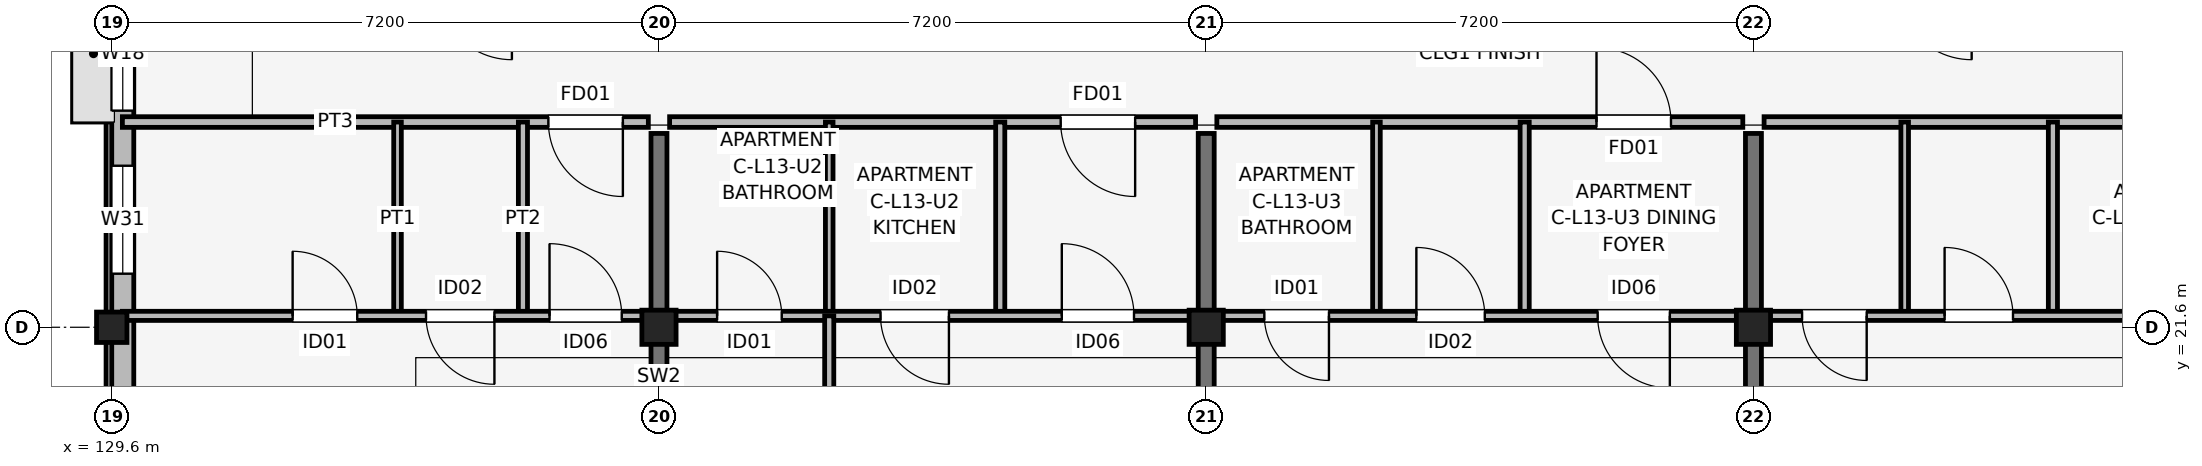
"""IFC4 building model, lengths in metres.
Left out: names, types, materials, properties, quantities, classifications, styles, units other than length and angle.
Written with IfcOpenShell. Run it as: python <this file> out.ifc"""

import sys

from ifc_helpers import new_model, si_unit, direction, frame, frame_2d, origin, origin_2d, place, context, subcontext, project, spatial, rectangle, extrude, element, fill, save


model = new_model("IFC4")
c1 = context("Model", 3, precision=1e-05, world=origin(), true_north=direction((0.0, 1.0)))
c2 = subcontext(c1, "Body", "Model", "MODEL_VIEW")
j1 = project(units=[si_unit("LENGTHUNIT", "METRE"), si_unit("PLANEANGLEUNIT", "RADIAN")], contexts=[c1])
p1 = place(None, origin())
s1 = spatial("IfcSite", under=j1, at=p1, CompositionType="ELEMENT")
p2 = place(p1, origin())
s2 = spatial("IfcBuilding", under=s1, at=p2, CompositionType="ELEMENT")
p3 = place(p2, frame((0.0, 0.0, 43.35)))
s3 = spatial("IfcBuildingStorey", under=s2, at=p3, CompositionType="ELEMENT", Elevation=43.35)
p4 = place(p3, frame((129.6, 21.6, 0.0), z_axis=(0.0, 0.0, 1.0), x_axis=(1.0, 0.0, 0.0)))
e1 = element("IfcColumn", 1, at=p4, inside=s3, PredefinedType="COLUMN", context=c2, shape_type="SweptSolid", body=[
    extrude(rectangle(XDim=0.4, YDim=0.4, at=origin_2d()), origin(), (0.0, 0.0, 1.0), 3.15),
])
for number, where, z_axis, x_axis in (
    (2, (136.8, 21.6, 0.0), (0.0, 0.0, 1.0), (1.0, 0.0, 0.0)),
    (3, (144.0, 21.6, 0.0), (0.0, 0.0, 1.0), (1.0, 0.0, 0.0)),
    (4, (151.2, 21.6, 0.0), (0.0, 0.0, 1.0), (1.0, 0.0, 0.0)),
):
    element("IfcColumn", number, at=place(p3, frame(where, z_axis=z_axis, x_axis=x_axis)), inside=s3, PredefinedType="COLUMN", context=c2, shape_type="SweptSolid", body=[
        extrude(rectangle(XDim=0.45, YDim=0.45, at=origin_2d()), origin(), (0.0, 0.0, 1.0), 3.15),
    ])
for number, where, z_axis, x_axis in (
    (5, (136.8, 17.75, 0.0), (0.0, 0.0, 1.0), (0.0, 1.0, 0.0)),
    (6, (144.0, 17.75, 0.0), (0.0, 0.0, 1.0), (0.0, 1.0, 0.0)),
    (7, (151.2, 17.75, 0.0), (0.0, 0.0, 1.0), (0.0, 1.0, 0.0)),
):
    element("IfcWall", number, at=place(p3, frame(where, z_axis=z_axis, x_axis=x_axis)), inside=s3, PredefinedType="SHEAR", context=c2, shape_type="SweptSolid", body=[
        extrude(rectangle(XDim=6.4, YDim=0.21, at=frame_2d((3.2, 0.0))), origin(), (0.0, 0.0, 1.0), 3.15),
    ])
p5 = place(p3, frame((129.745, 33.8, 0.0), z_axis=(0.0, 0.0, 1.0), x_axis=(0.0, -1.0, 0.0)))
e8 = element("IfcWall", 8, at=p5, inside=s3, PredefinedType="SOLIDWALL", context=c2, shape_type="SweptSolid", body=[
    extrude(rectangle(XDim=14.2, YDim=0.29, at=frame_2d((7.1, 0.0))), origin(), (0.0, 0.0, 1.0), 2.51),
])
p6 = place(p5, frame((7.85, 0.0, 1.05)))
e9 = element("IfcOpeningElement", 9, at=p6, cuts=e8, PredefinedType="OPENING", context=c2, shape_type="SweptSolid", body=[
    extrude(rectangle(XDim=1.5, YDim=1.15, at=frame_2d((0.75, 0.575))), frame((0.0, 0.155, 0.0), z_axis=(0.0, -1.0, 0.0), x_axis=(1.0, 0.0, 0.0)), (0.0, 0.0, 1.0), 0.31),
])
p7 = place(p5, frame((10.075, 0.0, 0.75)))
e10 = element("IfcOpeningElement", 10, at=p7, cuts=e8, PredefinedType="OPENING", context=c2, shape_type="SweptSolid", body=[
    extrude(rectangle(XDim=1.42, YDim=1.6, at=frame_2d((0.71, 0.8))), frame((0.0, 0.155, 0.0), z_axis=(0.0, -1.0, 0.0), x_axis=(1.0, 0.0, 0.0)), (0.0, 0.0, 1.0), 0.31),
])
p8 = place(p3, frame((129.74, 24.3, 0.0), z_axis=(0.0, 0.0, 1.0), x_axis=(1.0, 0.0, 0.0)))
e11 = element("IfcWall", 11, at=p8, inside=s3, PredefinedType="PARTITIONING", context=c2, shape_type="SweptSolid", body=[
    extrude(rectangle(XDim=6.92, YDim=0.14, at=frame_2d((3.46, 0.0))), origin(), (0.0, 0.0, 1.0), 2.38),
])
p9 = place(p8, frame((6.585, 0.0, 0.0), z_axis=(0.0, 0.0, 1.0), x_axis=(-1.0, 0.0, 0.0)))
e12 = element("IfcOpeningElement", 12, at=p9, cuts=e11, PredefinedType="OPENING", context=c2, shape_type="SweptSolid", body=[
    extrude(rectangle(XDim=0.98, YDim=2.1, at=frame_2d((0.49, 1.05))), frame((0.0, 0.08, 0.0), z_axis=(0.0, -1.0, 0.0), x_axis=(1.0, 0.0, 0.0)), (0.0, 0.0, 1.0), 0.16),
])
p10 = place(p3, frame((133.36, 21.75, 0.0), z_axis=(0.0, 0.0, 1.0), x_axis=(0.0, 1.0, 0.0)))
e13 = element("IfcWall", 13, at=p10, inside=s3, PredefinedType="PARTITIONING", context=c2, shape_type="SweptSolid", body=[
    extrude(rectangle(XDim=2.55, YDim=0.1, at=frame_2d((1.275, 0.0))), origin(), (0.0, 0.0, 1.0), 2.38),
])
p11 = place(p3, frame((135.01, 21.75, 0.0), z_axis=(0.0, 0.0, 1.0), x_axis=(0.0, 1.0, 0.0)))
e14 = element("IfcWall", 14, at=p11, inside=s3, PredefinedType="PARTITIONING", context=c2, shape_type="SweptSolid", body=[
    extrude(rectangle(XDim=2.55, YDim=0.12, at=frame_2d((1.275, 0.0))), origin(), (0.0, 0.0, 1.0), 2.38),
])
p12 = place(p3, frame((129.74, 21.75, 0.0), z_axis=(0.0, 0.0, 1.0), x_axis=(1.0, 0.0, 0.0)))
e15 = element("IfcWall", 15, at=p12, inside=s3, PredefinedType="PARTITIONING", context=c2, shape_type="SweptSolid", body=[
    extrude(rectangle(XDim=6.92, YDim=0.12, at=frame_2d((3.46, 0.0))), origin(), (0.0, 0.0, 1.0), 2.38),
])
p13 = place(p12, frame((2.24, 0.0, 0.0)))
e16 = element("IfcOpeningElement", 16, at=p13, cuts=e15, PredefinedType="OPENING", context=c2, shape_type="SweptSolid", body=[
    extrude(rectangle(XDim=0.85, YDim=2.08, at=frame_2d((0.425, 1.04))), frame((0.0, 0.07, 0.0), z_axis=(0.0, -1.0, 0.0), x_axis=(1.0, 0.0, 0.0)), (0.0, 0.0, 1.0), 0.14),
])
p14 = place(p12, frame((4.895, 0.0, 0.0), z_axis=(0.0, 0.0, 1.0), x_axis=(-1.0, 0.0, 0.0)))
e17 = element("IfcOpeningElement", 17, at=p14, cuts=e15, PredefinedType="OPENING", context=c2, shape_type="SweptSolid", body=[
    extrude(rectangle(XDim=0.9, YDim=2.08, at=frame_2d((0.45, 1.04))), frame((0.0, 0.07, 0.0), z_axis=(0.0, -1.0, 0.0), x_axis=(1.0, 0.0, 0.0)), (0.0, 0.0, 1.0), 0.14),
])
p15 = place(p12, frame((5.62, 0.0, 0.0)))
e18 = element("IfcOpeningElement", 18, at=p15, cuts=e15, PredefinedType="OPENING", context=c2, shape_type="SweptSolid", body=[
    extrude(rectangle(XDim=0.95, YDim=2.08, at=frame_2d((0.475, 1.04))), frame((0.0, 0.07, 0.0), z_axis=(0.0, -1.0, 0.0), x_axis=(1.0, 0.0, 0.0)), (0.0, 0.0, 1.0), 0.14),
])
p16 = place(p3, frame((136.94, 24.3, 0.0), z_axis=(0.0, 0.0, 1.0), x_axis=(1.0, 0.0, 0.0)))
e19 = element("IfcWall", 19, at=p16, inside=s3, PredefinedType="PARTITIONING", context=c2, shape_type="SweptSolid", body=[
    extrude(rectangle(XDim=6.92, YDim=0.14, at=frame_2d((3.46, 0.0))), origin(), (0.0, 0.0, 1.0), 2.38),
])
p17 = place(p16, frame((6.125, 0.0, 0.0), z_axis=(0.0, 0.0, 1.0), x_axis=(-1.0, 0.0, 0.0)))
e20 = element("IfcOpeningElement", 20, at=p17, cuts=e19, PredefinedType="OPENING", context=c2, shape_type="SweptSolid", body=[
    extrude(rectangle(XDim=0.98, YDim=2.1, at=frame_2d((0.49, 1.05))), frame((0.0, 0.08, 0.0), z_axis=(0.0, -1.0, 0.0), x_axis=(1.0, 0.0, 0.0)), (0.0, 0.0, 1.0), 0.16),
])
p18 = place(p3, frame((139.04, 21.75, 0.0), z_axis=(0.0, 0.0, 1.0), x_axis=(0.0, 1.0, 0.0)))
e21 = element("IfcWall", 21, at=p18, inside=s3, PredefinedType="PARTITIONING", context=c2, shape_type="SweptSolid", body=[
    extrude(rectangle(XDim=2.55, YDim=0.1, at=frame_2d((1.275, 0.0))), origin(), (0.0, 0.0, 1.0), 2.38),
])
p19 = place(p3, frame((141.29, 21.75, 0.0), z_axis=(0.0, 0.0, 1.0), x_axis=(0.0, 1.0, 0.0)))
e22 = element("IfcWall", 22, at=p19, inside=s3, PredefinedType="PARTITIONING", context=c2, shape_type="SweptSolid", body=[
    extrude(rectangle(XDim=2.55, YDim=0.12, at=frame_2d((1.275, 0.0))), origin(), (0.0, 0.0, 1.0), 2.38),
])
p20 = place(p3, frame((136.94, 21.75, 0.0), z_axis=(0.0, 0.0, 1.0), x_axis=(1.0, 0.0, 0.0)))
e23 = element("IfcWall", 23, at=p20, inside=s3, PredefinedType="PARTITIONING", context=c2, shape_type="SweptSolid", body=[
    extrude(rectangle(XDim=6.92, YDim=0.12, at=frame_2d((3.46, 0.0))), origin(), (0.0, 0.0, 1.0), 2.38),
])
p21 = place(p20, frame((0.625, 0.0, 0.0)))
e24 = element("IfcOpeningElement", 24, at=p21, cuts=e23, PredefinedType="OPENING", context=c2, shape_type="SweptSolid", body=[
    extrude(rectangle(XDim=0.85, YDim=2.08, at=frame_2d((0.425, 1.04))), frame((0.0, 0.07, 0.0), z_axis=(0.0, -1.0, 0.0), x_axis=(1.0, 0.0, 0.0)), (0.0, 0.0, 1.0), 0.14),
])
p22 = place(p20, frame((3.675, 0.0, 0.0), z_axis=(0.0, 0.0, 1.0), x_axis=(-1.0, 0.0, 0.0)))
e25 = element("IfcOpeningElement", 25, at=p22, cuts=e23, PredefinedType="OPENING", context=c2, shape_type="SweptSolid", body=[
    extrude(rectangle(XDim=0.9, YDim=2.08, at=frame_2d((0.45, 1.04))), frame((0.0, 0.07, 0.0), z_axis=(0.0, -1.0, 0.0), x_axis=(1.0, 0.0, 0.0)), (0.0, 0.0, 1.0), 0.14),
])
p23 = place(p20, frame((5.16, 0.0, 0.0)))
e26 = element("IfcOpeningElement", 26, at=p23, cuts=e23, PredefinedType="OPENING", context=c2, shape_type="SweptSolid", body=[
    extrude(rectangle(XDim=0.95, YDim=2.08, at=frame_2d((0.475, 1.04))), frame((0.0, 0.07, 0.0), z_axis=(0.0, -1.0, 0.0), x_axis=(1.0, 0.0, 0.0)), (0.0, 0.0, 1.0), 0.14),
])
p24 = place(p3, frame((139.04, 17.7, 0.0), z_axis=(0.0, 0.0, 1.0), x_axis=(0.0, 1.0, 0.0)))
e27 = element("IfcWall", 27, at=p24, inside=s3, PredefinedType="PARTITIONING", context=c2, shape_type="SweptSolid", body=[
    extrude(rectangle(XDim=4.05, YDim=0.12, at=frame_2d((2.025, 0.0))), origin(), (0.0, 0.0, 1.0), 2.38),
])
p25 = place(p24, frame((2.475, 0.0, 0.0), z_axis=(0.0, 0.0, 1.0), x_axis=(-1.0, 0.0, 0.0)))
e28 = element("IfcOpeningElement", 28, at=p25, cuts=e27, PredefinedType="OPENING", context=c2, shape_type="SweptSolid", body=[
    extrude(rectangle(XDim=0.9, YDim=2.08, at=frame_2d((0.45, 1.04))), frame((0.0, 0.07, 0.0), z_axis=(0.0, -1.0, 0.0), x_axis=(1.0, 0.0, 0.0)), (0.0, 0.0, 1.0), 0.14),
])
p26 = place(p3, frame((144.14, 24.3, 0.0), z_axis=(0.0, 0.0, 1.0), x_axis=(1.0, 0.0, 0.0)))
e29 = element("IfcWall", 29, at=p26, inside=s3, PredefinedType="PARTITIONING", context=c2, shape_type="SweptSolid", body=[
    extrude(rectangle(XDim=6.92, YDim=0.14, at=frame_2d((3.46, 0.0))), origin(), (0.0, 0.0, 1.0), 2.38),
])
p27 = place(p26, frame((4.995, 0.0, 0.0)))
e30 = element("IfcOpeningElement", 30, at=p27, cuts=e29, PredefinedType="OPENING", context=c2, shape_type="SweptSolid", body=[
    extrude(rectangle(XDim=0.98, YDim=2.1, at=frame_2d((0.49, 1.05))), frame((0.0, 0.08, 0.0), z_axis=(0.0, -1.0, 0.0), x_axis=(1.0, 0.0, 0.0)), (0.0, 0.0, 1.0), 0.16),
])
p28 = place(p3, frame((146.24, 21.75, 0.0), z_axis=(0.0, 0.0, 1.0), x_axis=(0.0, 1.0, 0.0)))
e31 = element("IfcWall", 31, at=p28, inside=s3, PredefinedType="PARTITIONING", context=c2, shape_type="SweptSolid", body=[
    extrude(rectangle(XDim=2.55, YDim=0.1, at=frame_2d((1.275, 0.0))), origin(), (0.0, 0.0, 1.0), 2.38),
])
p29 = place(p3, frame((148.19, 21.75, 0.0), z_axis=(0.0, 0.0, 1.0), x_axis=(0.0, 1.0, 0.0)))
e32 = element("IfcWall", 32, at=p29, inside=s3, PredefinedType="PARTITIONING", context=c2, shape_type="SweptSolid", body=[
    extrude(rectangle(XDim=2.55, YDim=0.12, at=frame_2d((1.275, 0.0))), origin(), (0.0, 0.0, 1.0), 2.38),
])
p30 = place(p3, frame((144.14, 21.75, 0.0), z_axis=(0.0, 0.0, 1.0), x_axis=(1.0, 0.0, 0.0)))
e33 = element("IfcWall", 33, at=p30, inside=s3, PredefinedType="PARTITIONING", context=c2, shape_type="SweptSolid", body=[
    extrude(rectangle(XDim=6.92, YDim=0.12, at=frame_2d((3.46, 0.0))), origin(), (0.0, 0.0, 1.0), 2.38),
])
p31 = place(p30, frame((1.475, 0.0, 0.0), z_axis=(0.0, 0.0, 1.0), x_axis=(-1.0, 0.0, 0.0)))
e34 = element("IfcOpeningElement", 34, at=p31, cuts=e33, PredefinedType="OPENING", context=c2, shape_type="SweptSolid", body=[
    extrude(rectangle(XDim=0.85, YDim=2.08, at=frame_2d((0.425, 1.04))), frame((0.0, 0.07, 0.0), z_axis=(0.0, -1.0, 0.0), x_axis=(1.0, 0.0, 0.0)), (0.0, 0.0, 1.0), 0.14),
])
p32 = place(p30, frame((2.625, 0.0, 0.0)))
e35 = element("IfcOpeningElement", 35, at=p32, cuts=e33, PredefinedType="OPENING", context=c2, shape_type="SweptSolid", body=[
    extrude(rectangle(XDim=0.9, YDim=2.08, at=frame_2d((0.45, 1.04))), frame((0.0, 0.07, 0.0), z_axis=(0.0, -1.0, 0.0), x_axis=(1.0, 0.0, 0.0)), (0.0, 0.0, 1.0), 0.14),
])
p33 = place(p30, frame((5.96, 0.0, 0.0), z_axis=(0.0, 0.0, 1.0), x_axis=(-1.0, 0.0, 0.0)))
e36 = element("IfcOpeningElement", 36, at=p33, cuts=e33, PredefinedType="OPENING", context=c2, shape_type="SweptSolid", body=[
    extrude(rectangle(XDim=0.95, YDim=2.08, at=frame_2d((0.475, 1.04))), frame((0.0, 0.07, 0.0), z_axis=(0.0, -1.0, 0.0), x_axis=(1.0, 0.0, 0.0)), (0.0, 0.0, 1.0), 0.14),
])
p34 = place(p3, frame((151.34, 24.3, 0.0), z_axis=(0.0, 0.0, 1.0), x_axis=(1.0, 0.0, 0.0)))
e37 = element("IfcWall", 37, at=p34, inside=s3, PredefinedType="PARTITIONING", context=c2, shape_type="SweptSolid", body=[
    extrude(rectangle(XDim=6.92, YDim=0.14, at=frame_2d((3.46, 0.0))), origin(), (0.0, 0.0, 1.0), 2.38),
])
p35 = place(p34, frame((4.87, 0.0, 0.0)))
e38 = element("IfcOpeningElement", 38, at=p35, cuts=e37, PredefinedType="OPENING", context=c2, shape_type="SweptSolid", body=[
    extrude(rectangle(XDim=0.98, YDim=2.1, at=frame_2d((0.49, 1.05))), frame((0.0, 0.08, 0.0), z_axis=(0.0, -1.0, 0.0), x_axis=(1.0, 0.0, 0.0)), (0.0, 0.0, 1.0), 0.16),
])
p36 = place(p3, frame((153.19, 21.75, 0.0), z_axis=(0.0, 0.0, 1.0), x_axis=(0.0, 1.0, 0.0)))
e39 = element("IfcWall", 39, at=p36, inside=s3, PredefinedType="PARTITIONING", context=c2, shape_type="SweptSolid", body=[
    extrude(rectangle(XDim=2.55, YDim=0.1, at=frame_2d((1.275, 0.0))), origin(), (0.0, 0.0, 1.0), 2.38),
])
p37 = place(p3, frame((155.14, 21.75, 0.0), z_axis=(0.0, 0.0, 1.0), x_axis=(0.0, 1.0, 0.0)))
e40 = element("IfcWall", 40, at=p37, inside=s3, PredefinedType="PARTITIONING", context=c2, shape_type="SweptSolid", body=[
    extrude(rectangle(XDim=2.55, YDim=0.12, at=frame_2d((1.275, 0.0))), origin(), (0.0, 0.0, 1.0), 2.38),
])
p38 = place(p3, frame((151.34, 21.75, 0.0), z_axis=(0.0, 0.0, 1.0), x_axis=(1.0, 0.0, 0.0)))
e41 = element("IfcWall", 41, at=p38, inside=s3, PredefinedType="PARTITIONING", context=c2, shape_type="SweptSolid", body=[
    extrude(rectangle(XDim=6.92, YDim=0.12, at=frame_2d((3.46, 0.0))), origin(), (0.0, 0.0, 1.0), 2.38),
])
p39 = place(p38, frame((1.35, 0.0, 0.0), z_axis=(0.0, 0.0, 1.0), x_axis=(-1.0, 0.0, 0.0)))
e42 = element("IfcOpeningElement", 42, at=p39, cuts=e41, PredefinedType="OPENING", context=c2, shape_type="SweptSolid", body=[
    extrude(rectangle(XDim=0.85, YDim=2.08, at=frame_2d((0.425, 1.04))), frame((0.0, 0.07, 0.0), z_axis=(0.0, -1.0, 0.0), x_axis=(1.0, 0.0, 0.0)), (0.0, 0.0, 1.0), 0.14),
])
p40 = place(p38, frame((2.375, 0.0, 0.0)))
e43 = element("IfcOpeningElement", 43, at=p40, cuts=e41, PredefinedType="OPENING", context=c2, shape_type="SweptSolid", body=[
    extrude(rectangle(XDim=0.9, YDim=2.08, at=frame_2d((0.45, 1.04))), frame((0.0, 0.07, 0.0), z_axis=(0.0, -1.0, 0.0), x_axis=(1.0, 0.0, 0.0)), (0.0, 0.0, 1.0), 0.14),
])
p41 = place(p38, frame((5.835, 0.0, 0.0), z_axis=(0.0, 0.0, 1.0), x_axis=(-1.0, 0.0, 0.0)))
e44 = element("IfcOpeningElement", 44, at=p41, cuts=e41, PredefinedType="OPENING", context=c2, shape_type="SweptSolid", body=[
    extrude(rectangle(XDim=0.95, YDim=2.08, at=frame_2d((0.475, 1.04))), frame((0.0, 0.07, 0.0), z_axis=(0.0, -1.0, 0.0), x_axis=(1.0, 0.0, 0.0)), (0.0, 0.0, 1.0), 0.14),
])
p42 = place(p6, origin())
e45 = element("IfcWindow", 45, at=p42, inside=s3, PartitioningType="SINGLE_PANEL", PredefinedType="WINDOW", context=c2, shape_type="SweptSolid", body=[
    extrude(rectangle(XDim=1.5, YDim=1.15, at=frame_2d((0.75, 0.575))), frame((0.0, 0.03, 0.0), z_axis=(0.0, -1.0, 0.0), x_axis=(1.0, 0.0, 0.0)), (0.0, 0.0, 1.0), 0.06),
])
fill(e9, e45)
p43 = place(p7, origin())
e46 = element("IfcWindow", 46, at=p43, inside=s3, PartitioningType="SINGLE_PANEL", PredefinedType="WINDOW", context=c2, shape_type="SweptSolid", body=[
    extrude(rectangle(XDim=1.42, YDim=1.6, at=frame_2d((0.71, 0.8))), frame((0.0, 0.03, 0.0), z_axis=(0.0, -1.0, 0.0), x_axis=(1.0, 0.0, 0.0)), (0.0, 0.0, 1.0), 0.06),
])
fill(e10, e46)
p44 = place(p9, origin())
e47 = element("IfcDoor", 47, at=p44, inside=s3, OperationType="SINGLE_SWING_RIGHT", PredefinedType="DOOR", context=c2, shape_type="SweptSolid", body=[
    extrude(rectangle(XDim=0.98, YDim=2.1, at=frame_2d((0.49, 1.05))), frame((0.0, 0.025, 0.0), z_axis=(0.0, -1.0, 0.0), x_axis=(1.0, 0.0, 0.0)), (0.0, 0.0, 1.0), 0.05),
])
fill(e12, e47)
p45 = place(p13, origin())
e48 = element("IfcDoor", 48, at=p45, inside=s3, OperationType="SINGLE_SWING_LEFT", PredefinedType="DOOR", context=c2, shape_type="SweptSolid", body=[
    extrude(rectangle(XDim=0.85, YDim=2.08, at=frame_2d((0.425, 1.04))), frame((0.0, 0.025, 0.0), z_axis=(0.0, -1.0, 0.0), x_axis=(1.0, 0.0, 0.0)), (0.0, 0.0, 1.0), 0.05),
])
fill(e16, e48)
p46 = place(p14, origin())
e49 = element("IfcDoor", 49, at=p46, inside=s3, OperationType="SINGLE_SWING_RIGHT", PredefinedType="DOOR", context=c2, shape_type="SweptSolid", body=[
    extrude(rectangle(XDim=0.9, YDim=2.08, at=frame_2d((0.45, 1.04))), frame((0.0, 0.025, 0.0), z_axis=(0.0, -1.0, 0.0), x_axis=(1.0, 0.0, 0.0)), (0.0, 0.0, 1.0), 0.05),
])
fill(e17, e49)
p47 = place(p15, origin())
e50 = element("IfcDoor", 50, at=p47, inside=s3, OperationType="SINGLE_SWING_LEFT", PredefinedType="DOOR", context=c2, shape_type="SweptSolid", body=[
    extrude(rectangle(XDim=0.95, YDim=2.08, at=frame_2d((0.475, 1.04))), frame((0.0, 0.025, 0.0), z_axis=(0.0, -1.0, 0.0), x_axis=(1.0, 0.0, 0.0)), (0.0, 0.0, 1.0), 0.05),
])
fill(e18, e50)
p48 = place(p17, origin())
e51 = element("IfcDoor", 51, at=p48, inside=s3, OperationType="SINGLE_SWING_RIGHT", PredefinedType="DOOR", context=c2, shape_type="SweptSolid", body=[
    extrude(rectangle(XDim=0.98, YDim=2.1, at=frame_2d((0.49, 1.05))), frame((0.0, 0.025, 0.0), z_axis=(0.0, -1.0, 0.0), x_axis=(1.0, 0.0, 0.0)), (0.0, 0.0, 1.0), 0.05),
])
fill(e20, e51)
p49 = place(p21, origin())
e52 = element("IfcDoor", 52, at=p49, inside=s3, OperationType="SINGLE_SWING_LEFT", PredefinedType="DOOR", context=c2, shape_type="SweptSolid", body=[
    extrude(rectangle(XDim=0.85, YDim=2.08, at=frame_2d((0.425, 1.04))), frame((0.0, 0.025, 0.0), z_axis=(0.0, -1.0, 0.0), x_axis=(1.0, 0.0, 0.0)), (0.0, 0.0, 1.0), 0.05),
])
fill(e24, e52)
p50 = place(p22, origin())
e53 = element("IfcDoor", 53, at=p50, inside=s3, OperationType="SINGLE_SWING_RIGHT", PredefinedType="DOOR", context=c2, shape_type="SweptSolid", body=[
    extrude(rectangle(XDim=0.9, YDim=2.08, at=frame_2d((0.45, 1.04))), frame((0.0, 0.025, 0.0), z_axis=(0.0, -1.0, 0.0), x_axis=(1.0, 0.0, 0.0)), (0.0, 0.0, 1.0), 0.05),
])
fill(e25, e53)
p51 = place(p23, origin())
e54 = element("IfcDoor", 54, at=p51, inside=s3, OperationType="SINGLE_SWING_LEFT", PredefinedType="DOOR", context=c2, shape_type="SweptSolid", body=[
    extrude(rectangle(XDim=0.95, YDim=2.08, at=frame_2d((0.475, 1.04))), frame((0.0, 0.025, 0.0), z_axis=(0.0, -1.0, 0.0), x_axis=(1.0, 0.0, 0.0)), (0.0, 0.0, 1.0), 0.05),
])
fill(e26, e54)
p52 = place(p27, origin())
e55 = element("IfcDoor", 55, at=p52, inside=s3, OperationType="SINGLE_SWING_LEFT", PredefinedType="DOOR", context=c2, shape_type="SweptSolid", body=[
    extrude(rectangle(XDim=0.98, YDim=2.1, at=frame_2d((0.49, 1.05))), frame((0.0, 0.025, 0.0), z_axis=(0.0, -1.0, 0.0), x_axis=(1.0, 0.0, 0.0)), (0.0, 0.0, 1.0), 0.05),
])
fill(e30, e55)
p53 = place(p31, origin())
e56 = element("IfcDoor", 56, at=p53, inside=s3, OperationType="SINGLE_SWING_RIGHT", PredefinedType="DOOR", context=c2, shape_type="SweptSolid", body=[
    extrude(rectangle(XDim=0.85, YDim=2.08, at=frame_2d((0.425, 1.04))), frame((0.0, 0.025, 0.0), z_axis=(0.0, -1.0, 0.0), x_axis=(1.0, 0.0, 0.0)), (0.0, 0.0, 1.0), 0.05),
])
fill(e34, e56)
p54 = place(p32, origin())
e57 = element("IfcDoor", 57, at=p54, inside=s3, OperationType="SINGLE_SWING_LEFT", PredefinedType="DOOR", context=c2, shape_type="SweptSolid", body=[
    extrude(rectangle(XDim=0.9, YDim=2.08, at=frame_2d((0.45, 1.04))), frame((0.0, 0.025, 0.0), z_axis=(0.0, -1.0, 0.0), x_axis=(1.0, 0.0, 0.0)), (0.0, 0.0, 1.0), 0.05),
])
fill(e35, e57)
p55 = place(p33, origin())
e58 = element("IfcDoor", 58, at=p55, inside=s3, OperationType="SINGLE_SWING_RIGHT", PredefinedType="DOOR", context=c2, shape_type="SweptSolid", body=[
    extrude(rectangle(XDim=0.95, YDim=2.08, at=frame_2d((0.475, 1.04))), frame((0.0, 0.025, 0.0), z_axis=(0.0, -1.0, 0.0), x_axis=(1.0, 0.0, 0.0)), (0.0, 0.0, 1.0), 0.05),
])
fill(e36, e58)
p56 = place(p39, origin())
e59 = element("IfcDoor", 59, at=p56, inside=s3, OperationType="SINGLE_SWING_RIGHT", PredefinedType="DOOR", context=c2, shape_type="SweptSolid", body=[
    extrude(rectangle(XDim=0.85, YDim=2.08, at=frame_2d((0.425, 1.04))), frame((0.0, 0.025, 0.0), z_axis=(0.0, -1.0, 0.0), x_axis=(1.0, 0.0, 0.0)), (0.0, 0.0, 1.0), 0.05),
])
fill(e42, e59)
p57 = place(p40, origin())
e60 = element("IfcDoor", 60, at=p57, inside=s3, OperationType="SINGLE_SWING_LEFT", PredefinedType="DOOR", context=c2, shape_type="SweptSolid", body=[
    extrude(rectangle(XDim=0.9, YDim=2.08, at=frame_2d((0.45, 1.04))), frame((0.0, 0.025, 0.0), z_axis=(0.0, -1.0, 0.0), x_axis=(1.0, 0.0, 0.0)), (0.0, 0.0, 1.0), 0.05),
])
fill(e43, e60)
save(model, sys.argv[1])
